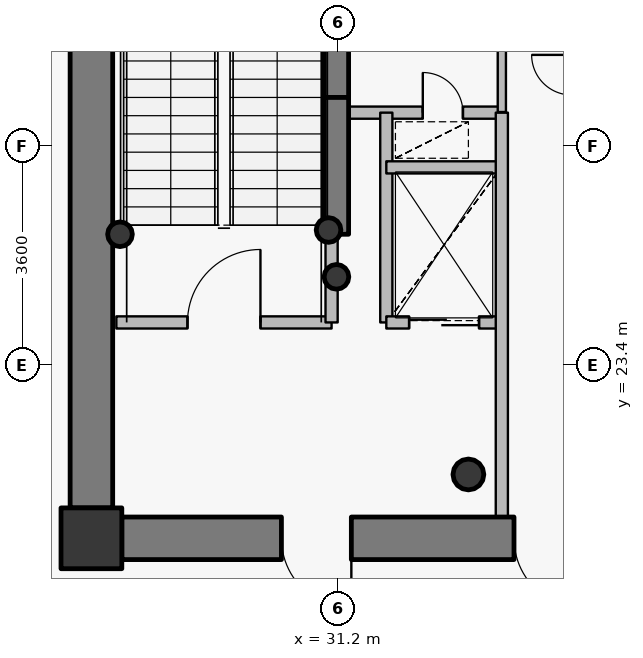
"""IFC4 building model, lengths in metres.
Left out: names, types, materials, properties, quantities, classifications, styles, units other than length and angle.
Written with IfcOpenShell. Run it as: python <this file> out.ifc"""

import sys

from ifc_helpers import new_model, si_unit, direction, frame, frame_2d, origin, origin_2d, place, context, subcontext, project, spatial, rectangle, hollow_circle, extrude, source, transform, mapped, element, fill, save


model = new_model("IFC4")
c1 = context("Model", 3, precision=1e-05, world=origin(), true_north=direction((0.0, 1.0)))
c2 = subcontext(c1, "Body", "Model", "MODEL_VIEW")
j1 = project(units=[si_unit("LENGTHUNIT", "METRE"), si_unit("PLANEANGLEUNIT", "RADIAN")], contexts=[c1])
p1 = place(None, origin())
s1 = spatial("IfcSite", under=j1, at=p1, CompositionType="ELEMENT")
p2 = place(p1, origin())
s2 = spatial("IfcBuilding", under=s1, at=p2, CompositionType="ELEMENT")
p3 = place(p2, frame((0.0, 0.0, 291.75)))
s3 = spatial("IfcBuildingStorey", under=s2, at=p3, CompositionType="ELEMENT", Elevation=291.75)
p4 = place(p3, frame((27.15, 20.55, 0.0), z_axis=(0.0, 0.0, 1.0), x_axis=(1.0, 0.0, 0.0)))
e1 = element("IfcColumn", 1, at=p4, inside=s3, PredefinedType="COLUMN", context=c2, shape_type="SweptSolid", body=[
    extrude(rectangle(XDim=1.0, YDim=1.0, at=origin_2d()), origin(), (0.0, 0.0, 1.0), 3.75),
])
p5 = place(p3, frame((33.35, 21.6, 0.0), z_axis=(0.0, 0.0, 1.0), x_axis=(1.0, 0.0, 0.0)))
e2 = element("IfcColumn", 2, at=p5, inside=s3, PredefinedType="COLUMN", context=c2, shape_type="SweptSolid", body=[
    extrude(hollow_circle(Radius=0.254, WallThickness=0.02, at=origin_2d()), origin(), (0.0, 0.0, 1.0), 3.75),
])
p6 = place(p3, frame((31.18, 27.8, 0.0), z_axis=(0.0, 0.0, 1.0), x_axis=(0.0, 1.0, 0.0)))
e3 = element("IfcWall", 3, at=p6, inside=s3, PredefinedType="SHEAR", context=c2, shape_type="SweptSolid", body=[
    extrude(rectangle(XDim=4.75, YDim=0.4, at=frame_2d((2.375, 0.0))), origin(), (0.0, 0.0, 1.0), 3.75),
])
for number, where, z_axis, x_axis in (
    (4, (31.05, 25.62, 0.0), (0.0, 0.0, 1.0), (1.0, 0.0, 0.0)),
    (5, (31.18, 24.85, 0.0), (0.0, 0.0, 1.0), (1.0, 0.0, 0.0)),
    (6, (27.62, 25.55, 0.0), (0.0, 0.0, 1.0), (1.0, 0.0, 0.0)),
):
    element("IfcColumn", number, at=place(p3, frame(where, z_axis=z_axis, x_axis=x_axis)), inside=s3, PredefinedType="COLUMN", context=c2, shape_type="SweptSolid", body=[
        extrude(hollow_circle(Radius=0.203, WallThickness=0.016, at=origin_2d()), origin(), (0.0, 0.0, 1.0), 3.75),
    ])
p7 = place(p3, frame((44.35, 20.55, 0.0), z_axis=(0.0, 0.0, 1.0), x_axis=(-1.0, 0.0, 0.0)))
e7 = element("IfcWall", 7, at=p7, inside=s3, PredefinedType="SHEAR", context=c2, shape_type="SweptSolid", body=[
    extrude(rectangle(XDim=16.7, YDim=0.7, at=frame_2d((8.35, 0.0))), origin(), (0.0, 0.0, 1.0), 3.05),
])
p8 = place(p7, frame((12.925, 0.0, 0.0)))
e8 = element("IfcOpeningElement", 8, at=p8, cuts=e7, PredefinedType="OPENING", context=c2, shape_type="SweptSolid", body=[
    extrude(rectangle(XDim=1.15, YDim=2.15, at=origin_2d()), frame((0.575, 0.36, 1.075), z_axis=(0.0, -1.0, 0.0), x_axis=(1.0, 0.0, 0.0)), (0.0, 0.0, 1.0), 0.72),
])
p9 = place(p7, frame((9.1, 0.0, 0.0)))
e9 = element("IfcOpeningElement", 9, at=p9, cuts=e7, PredefinedType="OPENING", context=c2, shape_type="SweptSolid", body=[
    extrude(rectangle(XDim=1.15, YDim=2.15, at=origin_2d()), frame((0.575, 0.36, 1.075), z_axis=(0.0, -1.0, 0.0), x_axis=(1.0, 0.0, 0.0)), (0.0, 0.0, 1.0), 0.72),
])
p10 = place(p3, frame((27.15, 21.05, 0.0), z_axis=(0.0, 0.0, 1.0), x_axis=(0.0, 1.0, 0.0)))
e10 = element("IfcWall", 10, at=p10, inside=s3, PredefinedType="SHEAR", context=c2, shape_type="SweptSolid", body=[
    extrude(rectangle(XDim=11.9, YDim=0.7, at=frame_2d((5.95, 0.0))), origin(), (0.0, 0.0, 1.0), 3.05),
])
p11 = place(p3, frame((31.18, 25.55, 0.0), z_axis=(0.0, 0.0, 1.0), x_axis=(0.0, 1.0, 0.0)))
e11 = element("IfcWall", 11, at=p11, inside=s3, PredefinedType="SHEAR", context=c2, shape_type="SweptSolid", body=[
    extrude(rectangle(XDim=2.25, YDim=0.4, at=frame_2d((1.125, 0.0))), origin(), (0.0, 0.0, 1.0), 3.1),
])
p12 = place(p3, frame((27.56, 24.1, 0.0), z_axis=(0.0, 0.0, 1.0), x_axis=(1.0, 0.0, 0.0)))
e12 = element("IfcWall", 12, at=p12, inside=s3, PredefinedType="PARTITIONING", context=c2, shape_type="SweptSolid", body=[
    extrude(rectangle(XDim=3.54, YDim=0.2, at=frame_2d((1.77, 0.0))), origin(), (0.0, 0.0, 1.0), 3.5),
])
p13 = place(p12, frame((1.17, 0.0, 0.0)))
e13 = element("IfcOpeningElement", 13, at=p13, cuts=e12, PredefinedType="OPENING", context=c2, shape_type="SweptSolid", body=[
    extrude(rectangle(XDim=1.2, YDim=2.15, at=origin_2d()), frame((0.6, 0.11, 1.075), z_axis=(0.0, -1.0, 0.0), x_axis=(1.0, 0.0, 0.0)), (0.0, 0.0, 1.0), 0.22),
])
p14 = place(p3, frame((31.1, 24.1, 0.0), z_axis=(0.0, 0.0, 1.0), x_axis=(0.0, 1.0, 0.0)))
e14 = element("IfcWall", 14, at=p14, inside=s3, PredefinedType="PARTITIONING", context=c2, shape_type="SweptSolid", body=[
    extrude(rectangle(XDim=1.44, YDim=0.2, at=frame_2d((0.72, 0.0))), origin(), (0.0, 0.0, 1.0), 3.5),
])
p15 = place(p3, frame((31.1, 27.55, 0.0), z_axis=(0.0, 0.0, 1.0), x_axis=(1.0, 0.0, 0.0)))
e15 = element("IfcWall", 15, at=p15, inside=s3, PredefinedType="PARTITIONING", context=c2, shape_type="SweptSolid", body=[
    extrude(rectangle(XDim=2.8, YDim=0.2, at=frame_2d((1.4, 0.0))), origin(), (0.0, 0.0, 1.0), 3.085),
])
p16 = place(p15, frame((1.5, 0.0, 0.0)))
e16 = element("IfcOpeningElement", 16, at=p16, cuts=e15, PredefinedType="OPENING", context=c2, shape_type="SweptSolid", body=[
    extrude(rectangle(XDim=0.66, YDim=2.05, at=origin_2d()), frame((0.33, 0.11, 1.025), z_axis=(0.0, -1.0, 0.0), x_axis=(1.0, 0.0, 0.0)), (0.0, 0.0, 1.0), 0.22),
])
p17 = place(p3, frame((32.0, 24.1, 0.0), z_axis=(0.0, 0.0, 1.0), x_axis=(0.0, 1.0, 0.0)))
e17 = element("IfcWall", 17, at=p17, inside=s3, PredefinedType="PARTITIONING", context=c2, shape_type="SweptSolid", body=[
    extrude(rectangle(XDim=3.45, YDim=0.2, at=frame_2d((1.725, 0.0))), origin(), (0.0, 0.0, 1.0), 3.5),
])
p18 = place(p3, frame((32.0, 24.1, 0.0), z_axis=(0.0, 0.0, 1.0), x_axis=(1.0, 0.0, 0.0)))
e18 = element("IfcWall", 18, at=p18, inside=s3, PredefinedType="PARTITIONING", context=c2, shape_type="SweptSolid", body=[
    extrude(rectangle(XDim=1.9, YDim=0.2, at=frame_2d((0.95, 0.0))), origin(), (0.0, 0.0, 1.0), 3.085),
])
p19 = place(p18, frame((0.375, 0.0, 0.0)))
e19 = element("IfcOpeningElement", 19, at=p19, cuts=e18, PredefinedType="OPENING", context=c2, shape_type="SweptSolid", body=[
    extrude(rectangle(XDim=1.15, YDim=2.15, at=origin_2d()), frame((0.575, 0.11, 1.075), z_axis=(0.0, -1.0, 0.0), x_axis=(1.0, 0.0, 0.0)), (0.0, 0.0, 1.0), 0.22),
])
p20 = place(p3, frame((32.0, 26.65, 0.0), z_axis=(0.0, 0.0, 1.0), x_axis=(1.0, 0.0, 0.0)))
e20 = element("IfcWall", 20, at=p20, inside=s3, PredefinedType="PARTITIONING", context=c2, shape_type="SweptSolid", body=[
    extrude(rectangle(XDim=1.9, YDim=0.2, at=frame_2d((0.95, 0.0))), origin(), (0.0, 0.0, 1.0), 3.085),
])
p21 = place(p3, frame((33.9, 20.9, 0.0), z_axis=(0.0, 0.0, 1.0), x_axis=(0.0, 1.0, 0.0)))
e21 = element("IfcWall", 21, at=p21, inside=s3, PredefinedType="PARTITIONING", context=c2, shape_type="SweptSolid", body=[
    extrude(rectangle(XDim=6.65, YDim=0.2, at=frame_2d((3.325, 0.0))), origin(), (0.0, 0.0, 1.0), 3.085),
])
p22 = place(p3, frame((33.9, 27.56, 0.0), z_axis=(0.0, 0.0, 1.0), x_axis=(0.0, 1.0, 0.0)))
e22 = element("IfcWall", 22, at=p22, inside=s3, PredefinedType="PARTITIONING", context=c2, shape_type="SweptSolid", body=[
    extrude(rectangle(XDim=5.54, YDim=0.135, at=frame_2d((2.77, 0.0))), origin(), (0.0, 0.0, 1.0), 3.085),
])
p23 = place(p22, frame((2.22, 0.0, 0.0)))
e23 = element("IfcOpeningElement", 23, at=p23, cuts=e22, PredefinedType="OPENING", context=c2, shape_type="SweptSolid", body=[
    extrude(rectangle(XDim=1.1, YDim=2.15, at=origin_2d()), frame((0.55, 0.078, 1.075), z_axis=(0.0, -1.0, 0.0), x_axis=(1.0, 0.0, 0.0)), (0.0, 0.0, 1.0), 0.155),
])
p24 = place(p3, frame((26.8, 21.04, 0.0), z_axis=(0.0, 0.0, 1.0), x_axis=(0.0, -1.0, 0.0)))
e24 = element("IfcWall", 24, at=p24, inside=s3, PredefinedType="PARTITIONING", context=c2, shape_type="SweptSolid", body=[
    extrude(rectangle(XDim=0.84, YDim=0.135, at=frame_2d((0.42, 0.0))), origin(), (0.0, 0.0, 1.0), 3.035),
])
p25 = place(p3, frame((27.107, 20.2, 0.0), z_axis=(0.0, 0.0, 1.0), x_axis=(1.0, 0.0, 0.0)))
e25 = element("IfcWall", 25, at=p25, inside=s3, PredefinedType="PARTITIONING", context=c2, shape_type="SweptSolid", body=[
    extrude(rectangle(XDim=0.532, YDim=0.135, at=frame_2d((0.266, 0.0))), origin(), (0.0, 0.0, 1.0), 3.035),
])
m1 = source(origin(), c2, "Body", "SweptSolid", [
    extrude(rectangle(XDim=1.15, YDim=2.15, at=origin_2d()), frame((0.575, 0.025, 1.075), z_axis=(0.0, -1.0, 0.0), x_axis=(1.0, 0.0, 0.0)), (0.0, 0.0, 1.0), 0.05),
])
p26 = place(p8, origin())
e26 = element("IfcDoor", 26, at=p26, inside=s3, OperationType="SINGLE_SWING_LEFT", PredefinedType="DOOR", context=c2, shape_type="MappedRepresentation", body=[
    mapped(m1, transform((0.0, 0.0, 0.0), x_axis=(1.0, 0.0, 0.0), y_axis=(0.0, 1.0, 0.0), z_axis=(0.0, 0.0, 1.0), scale=1.0)),
])
fill(e8, e26)
p27 = place(p9, origin())
e27 = element("IfcDoor", 27, at=p27, inside=s3, OperationType="SINGLE_SWING_LEFT", PredefinedType="DOOR", context=c2, shape_type="MappedRepresentation", body=[
    mapped(m1, transform((0.0, 0.0, 0.0), x_axis=(1.0, 0.0, 0.0), y_axis=(0.0, 1.0, 0.0), z_axis=(0.0, 0.0, 1.0), scale=1.0)),
])
fill(e9, e27)
m2 = source(origin(), c2, "Body", "SweptSolid", [
    extrude(rectangle(XDim=1.2, YDim=2.15, at=origin_2d()), frame((0.6, 0.025, 1.075), z_axis=(0.0, -1.0, 0.0), x_axis=(1.0, 0.0, 0.0)), (0.0, 0.0, 1.0), 0.05),
])
p28 = place(p13, origin())
e28 = element("IfcDoor", 28, at=p28, inside=s3, OperationType="SINGLE_SWING_RIGHT", PredefinedType="DOOR", context=c2, shape_type="MappedRepresentation", body=[
    mapped(m2, transform((0.0, 0.0, 0.0), x_axis=(1.0, 0.0, 0.0), y_axis=(0.0, 1.0, 0.0), z_axis=(0.0, 0.0, 1.0), scale=1.0)),
])
fill(e13, e28)
m3 = source(origin(), c2, "Body", "SweptSolid", [
    extrude(rectangle(XDim=1.15, YDim=2.15, at=origin_2d()), frame((0.575, 0.025, 1.075), z_axis=(0.0, -1.0, 0.0), x_axis=(1.0, 0.0, 0.0)), (0.0, 0.0, 1.0), 0.05),
])
p29 = place(p19, origin())
e29 = element("IfcDoor", 29, at=p29, inside=s3, OperationType="DOUBLE_DOOR_SLIDING", PredefinedType="USERDEFINED", context=c2, shape_type="MappedRepresentation", body=[
    mapped(m3, transform((0.0, 0.0, 0.0), x_axis=(1.0, 0.0, 0.0), y_axis=(0.0, 1.0, 0.0), z_axis=(0.0, 0.0, 1.0), scale=1.0)),
])
fill(e19, e29)
m4 = source(origin(), c2, "Body", "SweptSolid", [
    extrude(rectangle(XDim=0.66, YDim=2.05, at=origin_2d()), frame((0.33, 0.025, 1.025), z_axis=(0.0, -1.0, 0.0), x_axis=(1.0, 0.0, 0.0)), (0.0, 0.0, 1.0), 0.05),
])
p30 = place(p16, origin())
e30 = element("IfcDoor", 30, at=p30, inside=s3, OperationType="SINGLE_SWING_LEFT", PredefinedType="USERDEFINED", context=c2, shape_type="MappedRepresentation", body=[
    mapped(m4, transform((0.0, 0.0, 0.0), x_axis=(1.0, 0.0, 0.0), y_axis=(0.0, 1.0, 0.0), z_axis=(0.0, 0.0, 1.0), scale=1.0)),
])
fill(e16, e30)
save(model, sys.argv[1])
